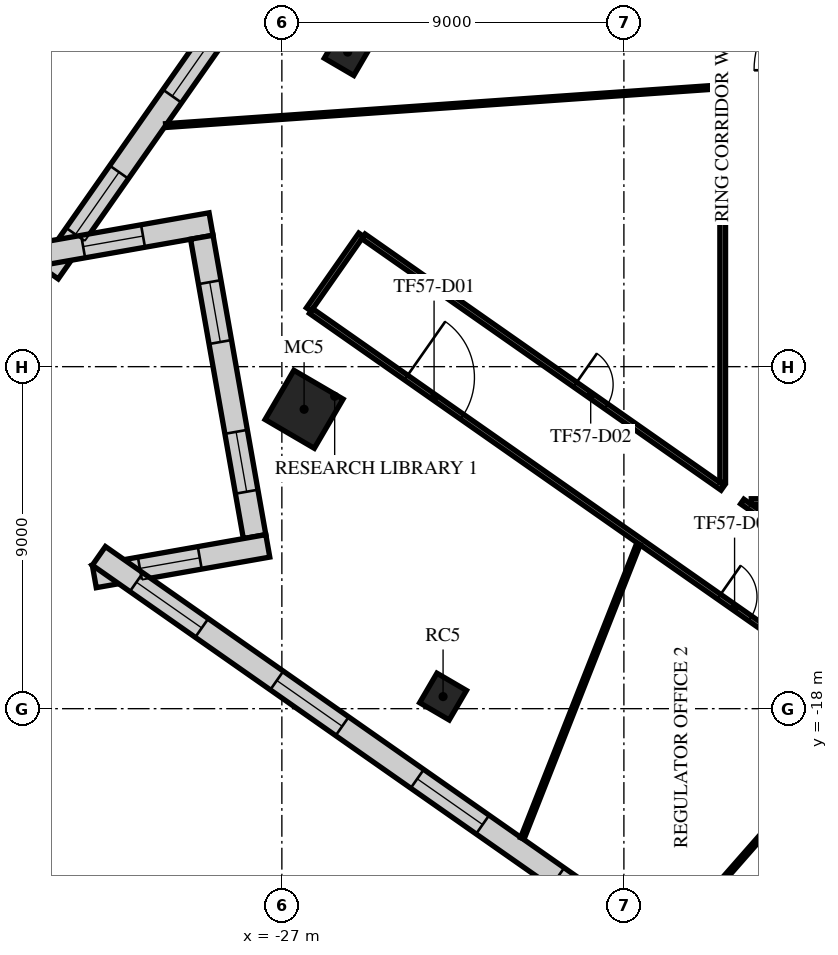
"""IFC4 building model, lengths in metres.
Left out: names, types, materials, properties, quantities, classifications, styles, units other than length and angle.
Written with IfcOpenShell. Run it as: python <this file> out.ifc"""

import sys

from ifc_helpers import new_model, si_unit, direction, frame, frame_2d, origin, origin_2d, place, context, subcontext, project, spatial, rectangle, extrude, element, fill, save


model = new_model("IFC4")
c1 = context("Model", 3, precision=1e-05, world=origin(), true_north=direction((0.0, 1.0)))
c2 = subcontext(c1, "Body", "Model", "MODEL_VIEW")
j1 = project(units=[si_unit("LENGTHUNIT", "METRE"), si_unit("PLANEANGLEUNIT", "RADIAN")], contexts=[c1])
p1 = place(None, origin())
s1 = spatial("IfcSite", under=j1, at=p1, CompositionType="ELEMENT")
p2 = place(p1, origin())
s2 = spatial("IfcBuilding", under=s1, at=p2, CompositionType="ELEMENT")
p3 = place(p2, frame((0.0, 0.0, 242.9)))
s3 = spatial("IfcBuildingStorey", under=s2, at=p3, CompositionType="ELEMENT", Elevation=242.9)
p4 = place(p3, frame((-25.268, -0.722, -0.36), z_axis=(0.0, 0.0, 1.0), x_axis=(0.504643651291, 0.863327739165, 0.0)))
e1 = element("IfcColumn", 1, at=p4, inside=s3, PredefinedType="COLUMN", context=c2, shape_type="SweptSolid", body=[
    extrude(rectangle(XDim=0.9, YDim=0.9, at=origin_2d()), origin(), (0.0, 0.0, 1.0), 4.36),
])
p5 = place(p3, frame((-26.415, -10.122, -0.36), z_axis=(0.0, 0.0, 1.0), x_axis=(0.504643651291, 0.863327739165, 0.0)))
e2 = element("IfcColumn", 2, at=p5, inside=s3, PredefinedType="COLUMN", context=c2, shape_type="SweptSolid", body=[
    extrude(rectangle(XDim=1.5, YDim=1.5, at=origin_2d()), origin(), (0.0, 0.0, 1.0), 4.36),
])
p6 = place(p3, frame((-22.758, -17.682, -0.36), z_axis=(0.0, 0.0, 1.0), x_axis=(0.504643651291, 0.863327739165, 0.0)))
e3 = element("IfcColumn", 3, at=p6, inside=s3, PredefinedType="COLUMN", context=c2, shape_type="SweptSolid", body=[
    extrude(rectangle(XDim=0.9, YDim=0.9, at=origin_2d()), origin(), (0.0, 0.0, 1.0), 4.36),
])
p7 = place(p3, frame((-5.115, 33.491, 0.0), z_axis=(0.0, 0.0, 1.0), x_axis=(-0.57357740375, -0.819151366908, 0.0)))
e4 = element("IfcWall", 4, at=p7, inside=s3, PredefinedType="STANDARD", context=c2, shape_type="SweptSolid", body=[
    extrude(rectangle(XDim=48.843, YDim=0.6, at=frame_2d((24.422, 0.0))), origin(), (0.0, 0.0, 1.0), 3.64),
])
p8 = place(p7, frame((1.22, 0.0, 0.9)))
e5 = element("IfcOpeningElement", 5, at=p8, cuts=e4, PredefinedType="OPENING", context=c2, shape_type="SweptSolid", body=[
    extrude(rectangle(XDim=2.0, YDim=2.1, at=frame_2d((1.0, 1.05))), frame((0.0, 0.31, 0.0), z_axis=(0.0, -1.0, 0.0), x_axis=(1.0, 0.0, 0.0)), (0.0, 0.0, 1.0), 0.62),
])
p9 = place(p7, frame((5.66, 0.0, 0.9)))
e6 = element("IfcOpeningElement", 6, at=p9, cuts=e4, PredefinedType="OPENING", context=c2, shape_type="SweptSolid", body=[
    extrude(rectangle(XDim=2.0, YDim=2.1, at=frame_2d((1.0, 1.05))), frame((0.0, 0.31, 0.0), z_axis=(0.0, -1.0, 0.0), x_axis=(1.0, 0.0, 0.0)), (0.0, 0.0, 1.0), 0.62),
])
p10 = place(p7, frame((10.101, 0.0, 0.9)))
e7 = element("IfcOpeningElement", 7, at=p10, cuts=e4, PredefinedType="OPENING", context=c2, shape_type="SweptSolid", body=[
    extrude(rectangle(XDim=2.0, YDim=2.1, at=frame_2d((1.0, 1.05))), frame((0.0, 0.31, 0.0), z_axis=(0.0, -1.0, 0.0), x_axis=(1.0, 0.0, 0.0)), (0.0, 0.0, 1.0), 0.62),
])
p11 = place(p7, frame((14.541, 0.0, 0.9)))
e8 = element("IfcOpeningElement", 8, at=p11, cuts=e4, PredefinedType="OPENING", context=c2, shape_type="SweptSolid", body=[
    extrude(rectangle(XDim=2.0, YDim=2.1, at=frame_2d((1.0, 1.05))), frame((0.0, 0.31, 0.0), z_axis=(0.0, -1.0, 0.0), x_axis=(1.0, 0.0, 0.0)), (0.0, 0.0, 1.0), 0.62),
])
p12 = place(p7, frame((18.981, 0.0, 0.9)))
e9 = element("IfcOpeningElement", 9, at=p12, cuts=e4, PredefinedType="OPENING", context=c2, shape_type="SweptSolid", body=[
    extrude(rectangle(XDim=2.0, YDim=2.1, at=frame_2d((1.0, 1.05))), frame((0.0, 0.31, 0.0), z_axis=(0.0, -1.0, 0.0), x_axis=(1.0, 0.0, 0.0)), (0.0, 0.0, 1.0), 0.62),
])
p13 = place(p7, frame((23.422, 0.0, 0.9)))
e10 = element("IfcOpeningElement", 10, at=p13, cuts=e4, PredefinedType="OPENING", context=c2, shape_type="SweptSolid", body=[
    extrude(rectangle(XDim=2.0, YDim=2.1, at=frame_2d((1.0, 1.05))), frame((0.0, 0.31, 0.0), z_axis=(0.0, -1.0, 0.0), x_axis=(1.0, 0.0, 0.0)), (0.0, 0.0, 1.0), 0.62),
])
p14 = place(p7, frame((27.862, 0.0, 0.9)))
e11 = element("IfcOpeningElement", 11, at=p14, cuts=e4, PredefinedType="OPENING", context=c2, shape_type="SweptSolid", body=[
    extrude(rectangle(XDim=2.0, YDim=2.1, at=frame_2d((1.0, 1.05))), frame((0.0, 0.31, 0.0), z_axis=(0.0, -1.0, 0.0), x_axis=(1.0, 0.0, 0.0)), (0.0, 0.0, 1.0), 0.62),
])
p15 = place(p7, frame((32.302, 0.0, 0.9)))
e12 = element("IfcOpeningElement", 12, at=p15, cuts=e4, PredefinedType="OPENING", context=c2, shape_type="SweptSolid", body=[
    extrude(rectangle(XDim=2.0, YDim=2.1, at=frame_2d((1.0, 1.05))), frame((0.0, 0.31, 0.0), z_axis=(0.0, -1.0, 0.0), x_axis=(1.0, 0.0, 0.0)), (0.0, 0.0, 1.0), 0.62),
])
p16 = place(p7, frame((36.742, 0.0, 0.9)))
e13 = element("IfcOpeningElement", 13, at=p16, cuts=e4, PredefinedType="OPENING", context=c2, shape_type="SweptSolid", body=[
    extrude(rectangle(XDim=2.0, YDim=2.1, at=frame_2d((1.0, 1.05))), frame((0.0, 0.31, 0.0), z_axis=(0.0, -1.0, 0.0), x_axis=(1.0, 0.0, 0.0)), (0.0, 0.0, 1.0), 0.62),
])
p17 = place(p7, frame((41.183, 0.0, 0.9)))
e14 = element("IfcOpeningElement", 14, at=p17, cuts=e4, PredefinedType="OPENING", context=c2, shape_type="SweptSolid", body=[
    extrude(rectangle(XDim=2.0, YDim=2.1, at=frame_2d((1.0, 1.05))), frame((0.0, 0.31, 0.0), z_axis=(0.0, -1.0, 0.0), x_axis=(1.0, 0.0, 0.0)), (0.0, 0.0, 1.0), 0.62),
])
p18 = place(p7, frame((45.623, 0.0, 0.9)))
e15 = element("IfcOpeningElement", 15, at=p18, cuts=e4, PredefinedType="OPENING", context=c2, shape_type="SweptSolid", body=[
    extrude(rectangle(XDim=2.0, YDim=2.1, at=frame_2d((1.0, 1.05))), frame((0.0, 0.31, 0.0), z_axis=(0.0, -1.0, 0.0), x_axis=(1.0, 0.0, 0.0)), (0.0, 0.0, 1.0), 0.62),
])
p19 = place(p3, frame((-33.429, -6.052, 0.0), z_axis=(0.0, 0.0, 1.0), x_axis=(0.984808997794, 0.173641118013, 0.0)))
e16 = element("IfcWall", 16, at=p19, inside=s3, PredefinedType="STANDARD", context=c2, shape_type="SweptSolid", body=[
    extrude(rectangle(XDim=4.635, YDim=0.6, at=frame_2d((2.318, 0.0))), origin(), (0.0, 0.0, 1.0), 3.64),
])
p20 = place(p19, frame((1.218, 0.0, 0.9)))
e17 = element("IfcOpeningElement", 17, at=p20, cuts=e16, PredefinedType="OPENING", context=c2, shape_type="SweptSolid", body=[
    extrude(rectangle(XDim=1.6, YDim=2.1, at=frame_2d((0.8, 1.05))), frame((0.0, 0.31, 0.0), z_axis=(0.0, -1.0, 0.0), x_axis=(1.0, 0.0, 0.0)), (0.0, 0.0, 1.0), 0.62),
])
p21 = place(p3, frame((-29.107, -5.594, 0.0), z_axis=(0.0, 0.0, 1.0), x_axis=(0.173640837858, -0.98480904719, 0.0)))
e18 = element("IfcWall", 18, at=p21, inside=s3, PredefinedType="STANDARD", context=c2, shape_type="SweptSolid", body=[
    extrude(rectangle(XDim=8.0, YDim=0.6, at=frame_2d((4.0, 0.0))), origin(), (0.0, 0.0, 1.0), 3.64),
])
p22 = place(p21, frame((1.2, 0.0, 0.9)))
e19 = element("IfcOpeningElement", 19, at=p22, cuts=e18, PredefinedType="OPENING", context=c2, shape_type="SweptSolid", body=[
    extrude(rectangle(XDim=1.6, YDim=2.1, at=frame_2d((0.8, 1.05))), frame((0.0, 0.31, 0.0), z_axis=(0.0, -1.0, 0.0), x_axis=(1.0, 0.0, 0.0)), (0.0, 0.0, 1.0), 0.62),
])
p23 = place(p21, frame((5.2, 0.0, 0.9)))
e20 = element("IfcOpeningElement", 20, at=p23, cuts=e18, PredefinedType="OPENING", context=c2, shape_type="SweptSolid", body=[
    extrude(rectangle(XDim=1.6, YDim=2.1, at=frame_2d((0.8, 1.05))), frame((0.0, 0.31, 0.0), z_axis=(0.0, -1.0, 0.0), x_axis=(1.0, 0.0, 0.0)), (0.0, 0.0, 1.0), 0.62),
])
p24 = place(p3, frame((-27.37, -13.716, 0.0), z_axis=(0.0, 0.0, 1.0), x_axis=(-0.984799990421, -0.173692195754, 0.0)))
e21 = element("IfcWall", 21, at=p24, inside=s3, PredefinedType="STANDARD", context=c2, shape_type="SweptSolid", body=[
    extrude(rectangle(XDim=4.636, YDim=0.6, at=frame_2d((2.318, 0.0))), origin(), (0.0, 0.0, 1.0), 3.64),
])
p25 = place(p24, frame((1.818, 0.0, 0.9)))
e22 = element("IfcOpeningElement", 22, at=p25, cuts=e21, PredefinedType="OPENING", context=c2, shape_type="SweptSolid", body=[
    extrude(rectangle(XDim=1.6, YDim=2.1, at=frame_2d((0.8, 1.05))), frame((0.0, 0.31, 0.0), z_axis=(0.0, -1.0, 0.0), x_axis=(1.0, 0.0, 0.0)), (0.0, 0.0, 1.0), 0.62),
])
p26 = place(p3, frame((-31.815, -13.98, 0.0), z_axis=(0.0, 0.0, 1.0), x_axis=(0.819151180661, -0.573577669737, 0.0)))
e23 = element("IfcWall", 23, at=p26, inside=s3, PredefinedType="STANDARD", context=c2, shape_type="SweptSolid", body=[
    extrude(rectangle(XDim=36.086, YDim=0.6, at=frame_2d((18.043, 0.0))), origin(), (0.0, 0.0, 1.0), 3.64),
])
p27 = place(p26, frame((1.205, 0.0, 0.9)))
e24 = element("IfcOpeningElement", 24, at=p27, cuts=e23, PredefinedType="OPENING", context=c2, shape_type="SweptSolid", body=[
    extrude(rectangle(XDim=2.1, YDim=2.1, at=frame_2d((1.05, 1.05))), frame((0.0, 0.31, 0.0), z_axis=(0.0, -1.0, 0.0), x_axis=(1.0, 0.0, 0.0)), (0.0, 0.0, 1.0), 0.62),
])
p28 = place(p26, frame((5.716, 0.0, 0.9)))
e25 = element("IfcOpeningElement", 25, at=p28, cuts=e23, PredefinedType="OPENING", context=c2, shape_type="SweptSolid", body=[
    extrude(rectangle(XDim=2.1, YDim=2.1, at=frame_2d((1.05, 1.05))), frame((0.0, 0.31, 0.0), z_axis=(0.0, -1.0, 0.0), x_axis=(1.0, 0.0, 0.0)), (0.0, 0.0, 1.0), 0.62),
])
p29 = place(p26, frame((10.227, 0.0, 0.9)))
e26 = element("IfcOpeningElement", 26, at=p29, cuts=e23, PredefinedType="OPENING", context=c2, shape_type="SweptSolid", body=[
    extrude(rectangle(XDim=2.1, YDim=2.1, at=frame_2d((1.05, 1.05))), frame((0.0, 0.31, 0.0), z_axis=(0.0, -1.0, 0.0), x_axis=(1.0, 0.0, 0.0)), (0.0, 0.0, 1.0), 0.62),
])
p30 = place(p26, frame((14.738, 0.0, 0.9)))
e27 = element("IfcOpeningElement", 27, at=p30, cuts=e23, PredefinedType="OPENING", context=c2, shape_type="SweptSolid", body=[
    extrude(rectangle(XDim=2.1, YDim=2.1, at=frame_2d((1.05, 1.05))), frame((0.0, 0.31, 0.0), z_axis=(0.0, -1.0, 0.0), x_axis=(1.0, 0.0, 0.0)), (0.0, 0.0, 1.0), 0.62),
])
p31 = place(p26, frame((19.249, 0.0, 0.9)))
e28 = element("IfcOpeningElement", 28, at=p31, cuts=e23, PredefinedType="OPENING", context=c2, shape_type="SweptSolid", body=[
    extrude(rectangle(XDim=2.1, YDim=2.1, at=frame_2d((1.05, 1.05))), frame((0.0, 0.31, 0.0), z_axis=(0.0, -1.0, 0.0), x_axis=(1.0, 0.0, 0.0)), (0.0, 0.0, 1.0), 0.62),
])
p32 = place(p26, frame((23.759, 0.0, 0.9)))
e29 = element("IfcOpeningElement", 29, at=p32, cuts=e23, PredefinedType="OPENING", context=c2, shape_type="SweptSolid", body=[
    extrude(rectangle(XDim=2.1, YDim=2.1, at=frame_2d((1.05, 1.05))), frame((0.0, 0.31, 0.0), z_axis=(0.0, -1.0, 0.0), x_axis=(1.0, 0.0, 0.0)), (0.0, 0.0, 1.0), 0.62),
])
p33 = place(p26, frame((28.27, 0.0, 0.9)))
e30 = element("IfcOpeningElement", 30, at=p33, cuts=e23, PredefinedType="OPENING", context=c2, shape_type="SweptSolid", body=[
    extrude(rectangle(XDim=2.1, YDim=2.1, at=frame_2d((1.05, 1.05))), frame((0.0, 0.31, 0.0), z_axis=(0.0, -1.0, 0.0), x_axis=(1.0, 0.0, 0.0)), (0.0, 0.0, 1.0), 0.62),
])
p34 = place(p26, frame((32.781, 0.0, 0.9)))
e31 = element("IfcOpeningElement", 31, at=p34, cuts=e23, PredefinedType="OPENING", context=c2, shape_type="SweptSolid", body=[
    extrude(rectangle(XDim=2.1, YDim=2.1, at=frame_2d((1.05, 1.05))), frame((0.0, 0.31, 0.0), z_axis=(0.0, -1.0, 0.0), x_axis=(1.0, 0.0, 0.0)), (0.0, 0.0, 1.0), 0.62),
])
p35 = place(p3, frame((-26.292, -7.494, 0.0), z_axis=(0.0, 0.0, 1.0), x_axis=(0.573708088123, 0.819059844958, 0.0)))
e32 = element("IfcWall", 32, at=p35, inside=s3, PredefinedType="PARTITIONING", context=c2, shape_type="SweptSolid", body=[
    extrude(rectangle(XDim=2.4, YDim=0.15, at=frame_2d((1.2, 0.0))), origin(), (0.0, 0.0, 1.0), 3.24),
])
p36 = place(p3, frame((-26.231, -7.537, 0.0), z_axis=(0.0, 0.0, 1.0), x_axis=(0.819166569978, -0.573555690959, 0.0)))
e33 = element("IfcWall", 33, at=p36, inside=s3, PredefinedType="PARTITIONING", context=c2, shape_type="SweptSolid", body=[
    extrude(rectangle(XDim=34.403, YDim=0.15, at=frame_2d((17.201, 0.0))), origin(), (0.0, 0.0, 1.0), 3.24),
])
p37 = place(p36, frame((3.05, 0.0, 0.0)))
e34 = element("IfcOpeningElement", 34, at=p37, cuts=e33, PredefinedType="OPENING", context=c2, shape_type="SweptSolid", body=[
    extrude(rectangle(XDim=1.8, YDim=2.1, at=frame_2d((0.9, 1.05))), frame((0.0, 0.085, 0.0), z_axis=(0.0, -1.0, 0.0), x_axis=(1.0, 0.0, 0.0)), (0.0, 0.0, 1.0), 0.17),
])
p38 = place(p36, frame((13.103, 0.0, 0.0)))
e35 = element("IfcOpeningElement", 35, at=p38, cuts=e33, PredefinedType="OPENING", context=c2, shape_type="SweptSolid", body=[
    extrude(rectangle(XDim=1.0, YDim=2.1, at=frame_2d((0.5, 1.05))), frame((0.0, 0.085, 0.0), z_axis=(0.0, -1.0, 0.0), x_axis=(1.0, 0.0, 0.0)), (0.0, 0.0, 1.0), 0.17),
])
p39 = place(p36, frame((19.173, 0.0, 0.0)))
e36 = element("IfcOpeningElement", 36, at=p39, cuts=e33, PredefinedType="OPENING", context=c2, shape_type="SweptSolid", body=[
    extrude(rectangle(XDim=1.0, YDim=2.1, at=frame_2d((0.5, 1.05))), frame((0.0, 0.085, 0.0), z_axis=(0.0, -1.0, 0.0), x_axis=(1.0, 0.0, 0.0)), (0.0, 0.0, 1.0), 0.17),
])
p40 = place(p3, frame((-24.854, -5.571, 0.0), z_axis=(0.0, 0.0, 1.0), x_axis=(0.819176259714, -0.573541851586, 0.0)))
e37 = element("IfcWall", 37, at=p40, inside=s3, PredefinedType="PARTITIONING", context=c2, shape_type="SweptSolid", body=[
    extrude(rectangle(XDim=11.54, YDim=0.15, at=frame_2d((5.77, 0.0))), origin(), (0.0, 0.0, 1.0), 3.24),
])
p41 = place(p40, frame((6.8, 0.0, 0.0)))
e38 = element("IfcOpeningElement", 38, at=p41, cuts=e37, PredefinedType="OPENING", context=c2, shape_type="SweptSolid", body=[
    extrude(rectangle(XDim=1.0, YDim=2.1, at=frame_2d((0.5, 1.05))), frame((0.0, 0.085, 0.0), z_axis=(0.0, -1.0, 0.0), x_axis=(1.0, 0.0, 0.0)), (0.0, 0.0, 1.0), 0.17),
])
p42 = place(p3, frame((-15.4, -12.046, 0.0), z_axis=(0.0, 0.0, 1.0), x_axis=(0.0, 1.0, 0.0)))
e39 = element("IfcWall", 39, at=p42, inside=s3, PredefinedType="PARTITIONING", context=c2, shape_type="SweptSolid", body=[
    extrude(rectangle(XDim=27.446, YDim=0.15, at=frame_2d((13.723, 0.0))), origin(), (0.0, 0.0, 1.0), 3.24),
])
p43 = place(p42, frame((12.961, 0.0, 0.0)))
e40 = element("IfcOpeningElement", 40, at=p43, cuts=e39, PredefinedType="OPENING", context=c2, shape_type="SweptSolid", body=[
    extrude(rectangle(XDim=1.0, YDim=2.1, at=frame_2d((0.5, 1.05))), frame((0.0, 0.085, 0.0), z_axis=(0.0, -1.0, 0.0), x_axis=(1.0, 0.0, 0.0)), (0.0, 0.0, 1.0), 0.17),
])
p44 = place(p3, frame((-14.886, -12.55, 0.0), z_axis=(0.0, 0.0, 1.0), x_axis=(0.819131763787, -0.57360539882, 0.0)))
e41 = element("IfcWall", 41, at=p44, inside=s3, PredefinedType="PARTITIONING", context=c2, shape_type="SweptSolid", body=[
    extrude(rectangle(XDim=7.559, YDim=0.15, at=frame_2d((3.78, 0.0))), origin(), (0.0, 0.0, 1.0), 3.24),
])
p45 = place(p44, frame((4.3, 0.0, 0.0)))
e42 = element("IfcOpeningElement", 42, at=p45, cuts=e41, PredefinedType="OPENING", context=c2, shape_type="SweptSolid", body=[
    extrude(rectangle(XDim=1.0, YDim=2.1, at=frame_2d((0.5, 1.05))), frame((0.0, 0.085, 0.0), z_axis=(0.0, -1.0, 0.0), x_axis=(1.0, 0.0, 0.0)), (0.0, 0.0, 1.0), 0.17),
])
p46 = place(p3, frame((-14.648, -12.55, 0.0), z_axis=(0.0, 0.0, 1.0), x_axis=(1.0, 0.0, 0.0)))
e43 = element("IfcWall", 43, at=p46, inside=s3, PredefinedType="PARTITIONING", context=c2, shape_type="SweptSolid", body=[
    extrude(rectangle(XDim=2.098, YDim=0.15, at=frame_2d((1.049, 0.0))), origin(), (0.0, 0.0, 1.0), 3.24),
])
p47 = place(p3, frame((-30.057, -2.656, 0.0), z_axis=(0.0, 0.0, 1.0), x_axis=(0.99756824466, 0.069696465096, 0.0)))
e44 = element("IfcWall", 44, at=p47, inside=s3, PredefinedType="PARTITIONING", context=c2, shape_type="SweptSolid", body=[
    extrude(rectangle(XDim=14.614, YDim=0.1, at=frame_2d((7.307, 0.0))), origin(), (0.0, 0.0, 1.0), 3.64),
])
p48 = place(p3, frame((-20.673, -21.413, 0.0), z_axis=(0.0, 0.0, 1.0), x_axis=(0.367046287702, 0.930202678283, 0.0)))
e45 = element("IfcWall", 45, at=p48, inside=s3, PredefinedType="PARTITIONING", context=c2, shape_type="SweptSolid", body=[
    extrude(rectangle(XDim=8.321, YDim=0.1, at=frame_2d((4.161, 0.0))), origin(), (0.0, 0.0, 1.0), 3.24),
])
p49 = place(p3, frame((-16.809, -24.119, 0.0), z_axis=(0.0, 0.0, 1.0), x_axis=(0.659598527061, 0.75161810988, 0.0)))
e46 = element("IfcWall", 46, at=p49, inside=s3, PredefinedType="PARTITIONING", context=c2, shape_type="SweptSolid", body=[
    extrude(rectangle(XDim=8.148, YDim=0.1, at=frame_2d((4.074, 0.0))), origin(), (0.0, 0.0, 1.0), 3.24),
])
p50 = place(p17, origin())
e47 = element("IfcWindow", 47, at=p50, inside=s3, PartitioningType="SINGLE_PANEL", PredefinedType="WINDOW", context=c2, shape_type="SweptSolid", body=[
    extrude(rectangle(XDim=2.0, YDim=2.1, at=frame_2d((1.0, 1.05))), frame((0.0, 0.03, 0.0), z_axis=(0.0, -1.0, 0.0), x_axis=(1.0, 0.0, 0.0)), (0.0, 0.0, 1.0), 0.06),
])
fill(e14, e47)
p51 = place(p18, origin())
e48 = element("IfcWindow", 48, at=p51, inside=s3, PartitioningType="SINGLE_PANEL", PredefinedType="WINDOW", context=c2, shape_type="SweptSolid", body=[
    extrude(rectangle(XDim=2.0, YDim=2.1, at=frame_2d((1.0, 1.05))), frame((0.0, 0.03, 0.0), z_axis=(0.0, -1.0, 0.0), x_axis=(1.0, 0.0, 0.0)), (0.0, 0.0, 1.0), 0.06),
])
fill(e15, e48)
p52 = place(p20, origin())
e49 = element("IfcWindow", 49, at=p52, inside=s3, PartitioningType="SINGLE_PANEL", PredefinedType="WINDOW", context=c2, shape_type="SweptSolid", body=[
    extrude(rectangle(XDim=1.6, YDim=2.1, at=frame_2d((0.8, 1.05))), frame((0.0, 0.03, 0.0), z_axis=(0.0, -1.0, 0.0), x_axis=(1.0, 0.0, 0.0)), (0.0, 0.0, 1.0), 0.06),
])
fill(e17, e49)
p53 = place(p22, origin())
e50 = element("IfcWindow", 50, at=p53, inside=s3, PartitioningType="SINGLE_PANEL", PredefinedType="WINDOW", context=c2, shape_type="SweptSolid", body=[
    extrude(rectangle(XDim=1.6, YDim=2.1, at=frame_2d((0.8, 1.05))), frame((0.0, 0.03, 0.0), z_axis=(0.0, -1.0, 0.0), x_axis=(1.0, 0.0, 0.0)), (0.0, 0.0, 1.0), 0.06),
])
fill(e19, e50)
p54 = place(p23, origin())
e51 = element("IfcWindow", 51, at=p54, inside=s3, PartitioningType="SINGLE_PANEL", PredefinedType="WINDOW", context=c2, shape_type="SweptSolid", body=[
    extrude(rectangle(XDim=1.6, YDim=2.1, at=frame_2d((0.8, 1.05))), frame((0.0, 0.03, 0.0), z_axis=(0.0, -1.0, 0.0), x_axis=(1.0, 0.0, 0.0)), (0.0, 0.0, 1.0), 0.06),
])
fill(e20, e51)
p55 = place(p25, origin())
e52 = element("IfcWindow", 52, at=p55, inside=s3, PartitioningType="SINGLE_PANEL", PredefinedType="WINDOW", context=c2, shape_type="SweptSolid", body=[
    extrude(rectangle(XDim=1.6, YDim=2.1, at=frame_2d((0.8, 1.05))), frame((0.0, 0.03, 0.0), z_axis=(0.0, -1.0, 0.0), x_axis=(1.0, 0.0, 0.0)), (0.0, 0.0, 1.0), 0.06),
])
fill(e22, e52)
p56 = place(p27, origin())
e53 = element("IfcWindow", 53, at=p56, inside=s3, PartitioningType="SINGLE_PANEL", PredefinedType="WINDOW", context=c2, shape_type="SweptSolid", body=[
    extrude(rectangle(XDim=2.1, YDim=2.1, at=frame_2d((1.05, 1.05))), frame((0.0, 0.03, 0.0), z_axis=(0.0, -1.0, 0.0), x_axis=(1.0, 0.0, 0.0)), (0.0, 0.0, 1.0), 0.06),
])
fill(e24, e53)
p57 = place(p28, origin())
e54 = element("IfcWindow", 54, at=p57, inside=s3, PartitioningType="SINGLE_PANEL", PredefinedType="WINDOW", context=c2, shape_type="SweptSolid", body=[
    extrude(rectangle(XDim=2.1, YDim=2.1, at=frame_2d((1.05, 1.05))), frame((0.0, 0.03, 0.0), z_axis=(0.0, -1.0, 0.0), x_axis=(1.0, 0.0, 0.0)), (0.0, 0.0, 1.0), 0.06),
])
fill(e25, e54)
p58 = place(p29, origin())
e55 = element("IfcWindow", 55, at=p58, inside=s3, PartitioningType="SINGLE_PANEL", PredefinedType="WINDOW", context=c2, shape_type="SweptSolid", body=[
    extrude(rectangle(XDim=2.1, YDim=2.1, at=frame_2d((1.05, 1.05))), frame((0.0, 0.03, 0.0), z_axis=(0.0, -1.0, 0.0), x_axis=(1.0, 0.0, 0.0)), (0.0, 0.0, 1.0), 0.06),
])
fill(e26, e55)
p59 = place(p37, frame((1.8, 0.0, 0.0), z_axis=(0.0, 0.0, 1.0), x_axis=(-1.0, 0.0, 0.0)))
e56 = element("IfcDoor", 56, at=p59, inside=s3, OperationType="DOUBLE_DOOR_SINGLE_SWING", PredefinedType="DOOR", context=c2, shape_type="SweptSolid", body=[
    extrude(rectangle(XDim=1.8, YDim=2.1, at=frame_2d((0.9, 1.05))), frame((0.0, 0.025, 0.0), z_axis=(0.0, -1.0, 0.0), x_axis=(1.0, 0.0, 0.0)), (0.0, 0.0, 1.0), 0.05),
])
fill(e34, e56)
p60 = place(p41, origin())
e57 = element("IfcDoor", 57, at=p60, inside=s3, OperationType="SINGLE_SWING_RIGHT", PredefinedType="DOOR", context=c2, shape_type="SweptSolid", body=[
    extrude(rectangle(XDim=1.0, YDim=2.1, at=frame_2d((0.5, 1.05))), frame((0.0, 0.025, 0.0), z_axis=(0.0, -1.0, 0.0), x_axis=(1.0, 0.0, 0.0)), (0.0, 0.0, 1.0), 0.05),
])
fill(e38, e57)
p61 = place(p38, frame((1.0, 0.0, 0.0), z_axis=(0.0, 0.0, 1.0), x_axis=(-1.0, 0.0, 0.0)))
e58 = element("IfcDoor", 58, at=p61, inside=s3, OperationType="SINGLE_SWING_LEFT", PredefinedType="DOOR", context=c2, shape_type="SweptSolid", body=[
    extrude(rectangle(XDim=1.0, YDim=2.1, at=frame_2d((0.5, 1.05))), frame((0.0, 0.025, 0.0), z_axis=(0.0, -1.0, 0.0), x_axis=(1.0, 0.0, 0.0)), (0.0, 0.0, 1.0), 0.05),
])
fill(e35, e58)
save(model, sys.argv[1])
